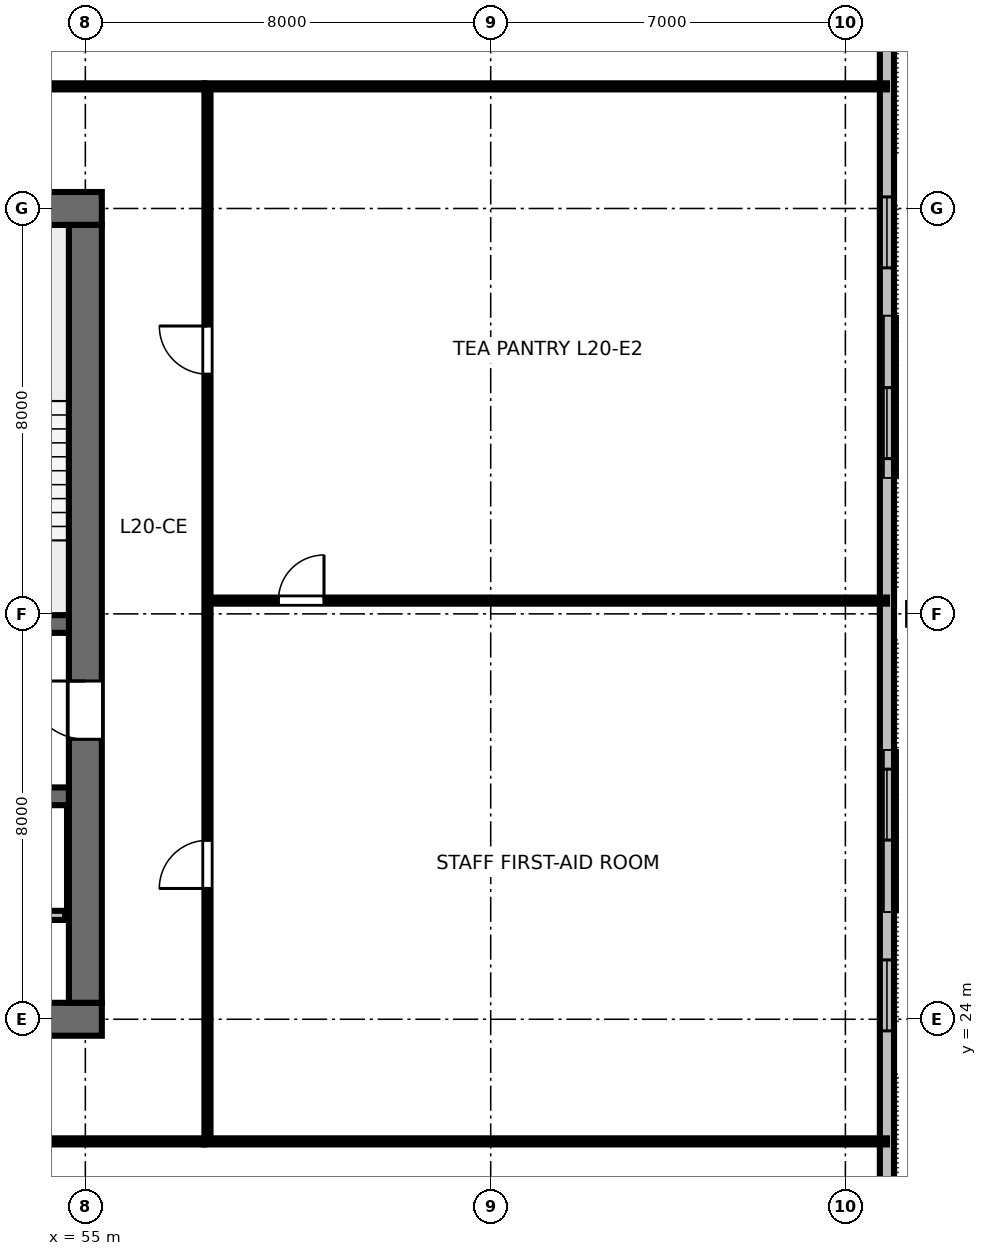
"""IFC4 building model, lengths in metres.
Left out: names, types, materials, properties, quantities, classifications, styles, units other than length and angle.
Written with IfcOpenShell. Run it as: python <this file> out.ifc"""

import sys

from ifc_helpers import new_model, si_unit, direction, frame, frame_2d, origin, origin_2d, place, context, subcontext, project, spatial, rectangle, i_section, extrude, element, fill, save


model = new_model("IFC4")
c1 = context("Model", 3, precision=1e-05, world=origin(), true_north=direction((0.0, 1.0)))
c2 = subcontext(c1, "Body", "Model", "MODEL_VIEW")
j1 = project(units=[si_unit("LENGTHUNIT", "METRE"), si_unit("PLANEANGLEUNIT", "RADIAN")], contexts=[c1])
p1 = place(None, origin())
s1 = spatial("IfcSite", under=j1, at=p1, CompositionType="ELEMENT")
p2 = place(p1, origin())
s2 = spatial("IfcBuilding", under=s1, at=p2, CompositionType="ELEMENT")
p3 = place(p2, frame((0.0, 0.0, 78.4)))
s3 = spatial("IfcBuildingStorey", under=s2, at=p3, CompositionType="ELEMENT", Elevation=78.4)
p4 = place(p3, frame((36.675, 24.0, 0.0), z_axis=(0.0, 0.0, 1.0), x_axis=(1.0, 0.0, 0.0)))
e1 = element("IfcWall", 1, at=p4, inside=s3, PredefinedType="SHEAR", context=c2, shape_type="SweptSolid", body=[
    extrude(rectangle(XDim=18.65, YDim=0.65, at=frame_2d((9.325, 0.0))), origin(), (0.0, 0.0, 1.0), 3.36),
])
p5 = place(p4, frame((5.725, 0.0, 0.0)))
e2 = element("IfcOpeningElement", 2, at=p5, cuts=e1, PredefinedType="OPENING", context=c2, shape_type="SweptSolid", body=[
    extrude(rectangle(XDim=1.6, YDim=2.15, at=frame_2d((0.8, 1.075))), frame((0.0, 0.335, 0.0), z_axis=(0.0, -1.0, 0.0), x_axis=(1.0, 0.0, 0.0)), (0.0, 0.0, 1.0), 0.67),
])
p6 = place(p4, frame((12.125, 0.0, 0.0)))
e3 = element("IfcOpeningElement", 3, at=p6, cuts=e1, PredefinedType="OPENING", context=c2, shape_type="SweptSolid", body=[
    extrude(rectangle(XDim=1.6, YDim=2.15, at=frame_2d((0.8, 1.075))), frame((0.0, 0.335, 0.0), z_axis=(0.0, -1.0, 0.0), x_axis=(1.0, 0.0, 0.0)), (0.0, 0.0, 1.0), 0.67),
])
p7 = place(p3, frame((36.675, 40.0, 0.0), z_axis=(0.0, 0.0, 1.0), x_axis=(1.0, 0.0, 0.0)))
e4 = element("IfcWall", 4, at=p7, inside=s3, PredefinedType="SHEAR", context=c2, shape_type="SweptSolid", body=[
    extrude(rectangle(XDim=18.65, YDim=0.65, at=frame_2d((9.325, 0.0))), origin(), (0.0, 0.0, 1.0), 3.36),
])
p8 = place(p7, frame((8.825, 0.0, 0.0)))
e5 = element("IfcOpeningElement", 5, at=p8, cuts=e4, PredefinedType="OPENING", context=c2, shape_type="SweptSolid", body=[
    extrude(rectangle(XDim=1.0, YDim=2.15, at=frame_2d((0.5, 1.075))), frame((0.0, 0.335, 0.0), z_axis=(0.0, -1.0, 0.0), x_axis=(1.0, 0.0, 0.0)), (0.0, 0.0, 1.0), 0.67),
])
p9 = place(p3, frame((55.0, 24.325, 0.0), z_axis=(0.0, 0.0, 1.0), x_axis=(0.0, 1.0, 0.0)))
e6 = element("IfcWall", 6, at=p9, inside=s3, PredefinedType="SHEAR", context=c2, shape_type="SweptSolid", body=[
    extrude(rectangle(XDim=15.35, YDim=0.65, at=frame_2d((7.675, 0.0))), origin(), (0.0, 0.0, 1.0), 3.36),
])
p10 = place(p9, frame((5.2, 0.0, 0.0)))
e7 = element("IfcOpeningElement", 7, at=p10, cuts=e6, PredefinedType="OPENING", context=c2, shape_type="SweptSolid", body=[
    extrude(rectangle(XDim=1.15, YDim=2.15, at=frame_2d((0.575, 1.075))), frame((0.0, 0.335, 0.0), z_axis=(0.0, -1.0, 0.0), x_axis=(1.0, 0.0, 0.0)), (0.0, 0.0, 1.0), 0.67),
])
p11 = place(p3, frame((37.325, 31.8, 0.0), z_axis=(0.0, 0.0, 1.0), x_axis=(1.0, 0.0, 0.0)))
e8 = element("IfcWall", 8, at=p11, inside=s3, PredefinedType="SHEAR", context=c2, shape_type="SweptSolid", body=[
    extrude(rectangle(XDim=17.35, YDim=0.35, at=frame_2d((8.675, 0.0))), origin(), (0.0, 0.0, 1.0), 3.36),
])
p12 = place(p11, frame((0.725, 0.0, 0.0)))
e9 = element("IfcOpeningElement", 9, at=p12, cuts=e8, PredefinedType="OPENING", context=c2, shape_type="SweptSolid", body=[
    extrude(rectangle(XDim=1.1, YDim=2.15, at=frame_2d((0.55, 1.075))), frame((0.0, 0.185, 0.0), z_axis=(0.0, -1.0, 0.0), x_axis=(1.0, 0.0, 0.0)), (0.0, 0.0, 1.0), 0.37),
])
p13 = place(p11, frame((14.625, 0.0, 0.0)))
e10 = element("IfcOpeningElement", 10, at=p13, cuts=e8, PredefinedType="OPENING", context=c2, shape_type="SweptSolid", body=[
    extrude(rectangle(XDim=1.1, YDim=2.15, at=frame_2d((0.55, 1.075))), frame((0.0, 0.185, 0.0), z_axis=(0.0, -1.0, 0.0), x_axis=(1.0, 0.0, 0.0)), (0.0, 0.0, 1.0), 0.37),
])
p14 = place(p3, frame((37.325, 28.4, 0.0), z_axis=(0.0, 0.0, 1.0), x_axis=(1.0, 0.0, 0.0)))
e11 = element("IfcWall", 11, at=p14, inside=s3, PredefinedType="SHEAR", context=c2, shape_type="SweptSolid", body=[
    extrude(rectangle(XDim=17.35, YDim=0.35, at=frame_2d((8.675, 0.0))), origin(), (0.0, 0.0, 1.0), 3.36),
])
p15 = place(p3, frame((71.48, 32.0, 0.0), z_axis=(-0.190004151907, 0.0, 0.981783286809), x_axis=(0.981783286809, 0.0, 0.190004151907)))
e12 = element("IfcColumn", 12, at=p15, inside=s3, PredefinedType="COLUMN", context=c2, shape_type="SweptSolid", body=[
    extrude(i_section(OverallWidth=0.428, OverallDepth=0.483, WebThickness=0.051, FlangeThickness=0.082, FilletRadius=0.025, at=origin_2d()), origin(), (0.0, 0.0, 1.0), 3.42),
])
p16 = place(p3, frame((70.82, 13.96, 0.0), z_axis=(0.0, 0.0, 1.0), x_axis=(0.0, 1.0, 0.0)))
e13 = element("IfcWall", 13, at=p16, inside=s3, PredefinedType="STANDARD", context=c2, shape_type="SweptSolid", body=[
    extrude(rectangle(XDim=36.08, YDim=0.28, at=frame_2d((18.04, 0.0))), origin(), (0.0, 0.0, 1.0), 2.662),
])
p17 = place(p16, frame((9.811, 0.0, 0.85)))
e14 = element("IfcOpeningElement", 14, at=p17, cuts=e13, PredefinedType="OPENING", context=c2, shape_type="SweptSolid", body=[
    extrude(rectangle(XDim=1.4, YDim=1.2, at=frame_2d((0.7, 0.6))), frame((0.0, 0.15, 0.0), z_axis=(0.0, -1.0, 0.0), x_axis=(1.0, 0.0, 0.0)), (0.0, 0.0, 1.0), 0.3),
])
p18 = place(p16, frame((13.576, 0.0, 0.85)))
e15 = element("IfcOpeningElement", 15, at=p18, cuts=e13, PredefinedType="OPENING", context=c2, shape_type="SweptSolid", body=[
    extrude(rectangle(XDim=1.4, YDim=1.2, at=frame_2d((0.7, 0.6))), frame((0.0, 0.15, 0.0), z_axis=(0.0, -1.0, 0.0), x_axis=(1.0, 0.0, 0.0)), (0.0, 0.0, 1.0), 0.3),
])
p19 = place(p16, frame((21.104, 0.0, 0.85)))
e16 = element("IfcOpeningElement", 16, at=p19, cuts=e13, PredefinedType="OPENING", context=c2, shape_type="SweptSolid", body=[
    extrude(rectangle(XDim=1.4, YDim=1.2, at=frame_2d((0.7, 0.6))), frame((0.0, 0.15, 0.0), z_axis=(0.0, -1.0, 0.0), x_axis=(1.0, 0.0, 0.0)), (0.0, 0.0, 1.0), 0.3),
])
p20 = place(p16, frame((24.869, 0.0, 0.85)))
e17 = element("IfcOpeningElement", 17, at=p20, cuts=e13, PredefinedType="OPENING", context=c2, shape_type="SweptSolid", body=[
    extrude(rectangle(XDim=1.4, YDim=1.2, at=frame_2d((0.7, 0.6))), frame((0.0, 0.15, 0.0), z_axis=(0.0, -1.0, 0.0), x_axis=(1.0, 0.0, 0.0)), (0.0, 0.0, 1.0), 0.3),
])
p21 = place(p3, frame((37.4, 26.05, 0.0), z_axis=(0.0, 0.0, 1.0), x_axis=(1.0, 0.0, 0.0)))
e18 = element("IfcWall", 18, at=p21, inside=s3, PredefinedType="PARTITIONING", context=c2, shape_type="SweptSolid", body=[
    extrude(rectangle(XDim=17.2, YDim=0.18, at=frame_2d((8.6, 0.0))), origin(), (0.0, 0.0, 1.0), 3.36),
])
p22 = place(p21, frame((1.1, 0.0, 0.0)))
e19 = element("IfcOpeningElement", 19, at=p22, cuts=e18, PredefinedType="OPENING", context=c2, shape_type="SweptSolid", body=[
    extrude(rectangle(XDim=1.05, YDim=2.15, at=frame_2d((0.525, 1.075))), frame((0.0, 0.1, 0.0), z_axis=(0.0, -1.0, 0.0), x_axis=(1.0, 0.0, 0.0)), (0.0, 0.0, 1.0), 0.2),
])
p23 = place(p21, frame((3.0, 0.0, 0.0)))
e20 = element("IfcOpeningElement", 20, at=p23, cuts=e18, PredefinedType="OPENING", context=c2, shape_type="SweptSolid", body=[
    extrude(rectangle(XDim=1.05, YDim=2.15, at=frame_2d((0.525, 1.075))), frame((0.0, 0.1, 0.0), z_axis=(0.0, -1.0, 0.0), x_axis=(1.0, 0.0, 0.0)), (0.0, 0.0, 1.0), 0.2),
])
p24 = place(p3, frame((34.65, 21.59, 0.0), z_axis=(0.0, 0.0, 1.0), x_axis=(1.0, 0.0, 0.0)))
e21 = element("IfcWall", 21, at=p24, inside=s3, PredefinedType="PARTITIONING", context=c2, shape_type="SweptSolid", body=[
    extrude(rectangle(XDim=22.7, YDim=0.12, at=frame_2d((11.35, 0.0))), origin(), (0.0, 0.0, 1.0), 2.64),
])
p25 = place(p24, frame((3.463, 0.0, 0.0)))
e22 = element("IfcOpeningElement", 22, at=p25, cuts=e21, PredefinedType="OPENING", context=c2, shape_type="SweptSolid", body=[
    extrude(rectangle(XDim=0.95, YDim=2.15, at=frame_2d((0.475, 1.075))), frame((0.0, 0.07, 0.0), z_axis=(0.0, -1.0, 0.0), x_axis=(1.0, 0.0, 0.0)), (0.0, 0.0, 1.0), 0.14),
])
p26 = place(p24, frame((14.673, 0.0, 0.0)))
e23 = element("IfcOpeningElement", 23, at=p26, cuts=e21, PredefinedType="OPENING", context=c2, shape_type="SweptSolid", body=[
    extrude(rectangle(XDim=0.95, YDim=2.15, at=frame_2d((0.475, 1.075))), frame((0.0, 0.07, 0.0), z_axis=(0.0, -1.0, 0.0), x_axis=(1.0, 0.0, 0.0)), (0.0, 0.0, 1.0), 0.14),
])
p27 = place(p3, frame((34.65, 42.41, 0.0), z_axis=(0.0, 0.0, 1.0), x_axis=(1.0, 0.0, 0.0)))
e24 = element("IfcWall", 24, at=p27, inside=s3, PredefinedType="PARTITIONING", context=c2, shape_type="SweptSolid", body=[
    extrude(rectangle(XDim=22.7, YDim=0.12, at=frame_2d((11.35, 0.0))), origin(), (0.0, 0.0, 1.0), 2.64),
])
p28 = place(p27, frame((4.272, 0.0, 0.0)))
e25 = element("IfcOpeningElement", 25, at=p28, cuts=e24, PredefinedType="OPENING", context=c2, shape_type="SweptSolid", body=[
    extrude(rectangle(XDim=0.95, YDim=2.15, at=frame_2d((0.475, 1.075))), frame((0.0, 0.07, 0.0), z_axis=(0.0, -1.0, 0.0), x_axis=(1.0, 0.0, 0.0)), (0.0, 0.0, 1.0), 0.14),
])
p29 = place(p27, frame((11.432, 0.0, 0.0)))
e26 = element("IfcOpeningElement", 26, at=p29, cuts=e24, PredefinedType="OPENING", context=c2, shape_type="SweptSolid", body=[
    extrude(rectangle(XDim=0.95, YDim=2.15, at=frame_2d((0.475, 1.075))), frame((0.0, 0.07, 0.0), z_axis=(0.0, -1.0, 0.0), x_axis=(1.0, 0.0, 0.0)), (0.0, 0.0, 1.0), 0.14),
])
p30 = place(p27, frame((18.035, 0.0, 0.0)))
e27 = element("IfcOpeningElement", 27, at=p30, cuts=e24, PredefinedType="OPENING", context=c2, shape_type="SweptSolid", body=[
    extrude(rectangle(XDim=0.95, YDim=2.15, at=frame_2d((0.475, 1.075))), frame((0.0, 0.07, 0.0), z_axis=(0.0, -1.0, 0.0), x_axis=(1.0, 0.0, 0.0)), (0.0, 0.0, 1.0), 0.14),
])
p31 = place(p3, frame((57.41, 32.262, 0.0), z_axis=(0.0, 0.0, 1.0), x_axis=(1.0, 0.0, 0.0)))
e28 = element("IfcWall", 28, at=p31, inside=s3, PredefinedType="PARTITIONING", context=c2, shape_type="SweptSolid", body=[
    extrude(rectangle(XDim=13.41, YDim=0.12, at=frame_2d((6.705, 0.0))), origin(), (0.0, 0.0, 1.0), 2.64),
])
p32 = place(p31, frame((1.4, 0.0, 0.0)))
e29 = element("IfcOpeningElement", 29, at=p32, cuts=e28, PredefinedType="OPENING", context=c2, shape_type="SweptSolid", body=[
    extrude(rectangle(XDim=0.9, YDim=2.15, at=frame_2d((0.45, 1.075))), frame((0.0, 0.07, 0.0), z_axis=(0.0, -1.0, 0.0), x_axis=(1.0, 0.0, 0.0)), (0.0, 0.0, 1.0), 0.14),
])
p33 = place(p3, frame((57.41, 21.65, 0.0), z_axis=(0.0, 0.0, 1.0), x_axis=(0.0, 1.0, 0.0)))
e30 = element("IfcWall", 30, at=p33, inside=s3, PredefinedType="PARTITIONING", context=c2, shape_type="SweptSolid", body=[
    extrude(rectangle(XDim=20.7, YDim=0.12, at=frame_2d((10.35, 0.0))), origin(), (0.0, 0.0, 1.0), 2.64),
])
p34 = place(p33, frame((4.931, 0.0, 0.0)))
e31 = element("IfcOpeningElement", 31, at=p34, cuts=e30, PredefinedType="OPENING", context=c2, shape_type="SweptSolid", body=[
    extrude(rectangle(XDim=0.95, YDim=2.15, at=frame_2d((0.475, 1.075))), frame((0.0, 0.07, 0.0), z_axis=(0.0, -1.0, 0.0), x_axis=(1.0, 0.0, 0.0)), (0.0, 0.0, 1.0), 0.14),
])
p35 = place(p33, frame((15.081, 0.0, 0.0)))
e32 = element("IfcOpeningElement", 32, at=p35, cuts=e30, PredefinedType="OPENING", context=c2, shape_type="SweptSolid", body=[
    extrude(rectangle(XDim=0.95, YDim=2.15, at=frame_2d((0.475, 1.075))), frame((0.0, 0.07, 0.0), z_axis=(0.0, -1.0, 0.0), x_axis=(1.0, 0.0, 0.0)), (0.0, 0.0, 1.0), 0.14),
])
for number, where, z_axis, x_axis in (
    (33, (57.35, 21.59, 0.0), (0.0, 0.0, 1.0), (1.0, 0.0, 0.0)),
    (34, (57.35, 42.41, 0.0), (0.0, 0.0, 1.0), (1.0, 0.0, 0.0)),
):
    element("IfcWall", number, at=place(p3, frame(where, z_axis=z_axis, x_axis=x_axis)), inside=s3, PredefinedType="PARTITIONING", context=c2, shape_type="SweptSolid", body=[
        extrude(rectangle(XDim=13.47, YDim=0.12, at=frame_2d((6.735, 0.0))), origin(), (0.0, 0.0, 1.0), 2.64),
    ])
p36 = place(p17, origin())
e35 = element("IfcWindow", 35, at=p36, inside=s3, PartitioningType="SINGLE_PANEL", PredefinedType="WINDOW", context=c2, shape_type="SweptSolid", body=[
    extrude(rectangle(XDim=1.4, YDim=1.2, at=frame_2d((0.7, 0.6))), frame((0.0, 0.03, 0.0), z_axis=(0.0, -1.0, 0.0), x_axis=(1.0, 0.0, 0.0)), (0.0, 0.0, 1.0), 0.06),
])
fill(e14, e35)
p37 = place(p18, origin())
e36 = element("IfcWindow", 36, at=p37, inside=s3, PartitioningType="SINGLE_PANEL", PredefinedType="WINDOW", context=c2, shape_type="SweptSolid", body=[
    extrude(rectangle(XDim=1.4, YDim=1.2, at=frame_2d((0.7, 0.6))), frame((0.0, 0.03, 0.0), z_axis=(0.0, -1.0, 0.0), x_axis=(1.0, 0.0, 0.0)), (0.0, 0.0, 1.0), 0.06),
])
fill(e15, e36)
p38 = place(p19, origin())
e37 = element("IfcWindow", 37, at=p38, inside=s3, PartitioningType="SINGLE_PANEL", PredefinedType="WINDOW", context=c2, shape_type="SweptSolid", body=[
    extrude(rectangle(XDim=1.4, YDim=1.2, at=frame_2d((0.7, 0.6))), frame((0.0, 0.03, 0.0), z_axis=(0.0, -1.0, 0.0), x_axis=(1.0, 0.0, 0.0)), (0.0, 0.0, 1.0), 0.06),
])
fill(e16, e37)
p39 = place(p20, origin())
e38 = element("IfcWindow", 38, at=p39, inside=s3, PartitioningType="SINGLE_PANEL", PredefinedType="WINDOW", context=c2, shape_type="SweptSolid", body=[
    extrude(rectangle(XDim=1.4, YDim=1.2, at=frame_2d((0.7, 0.6))), frame((0.0, 0.03, 0.0), z_axis=(0.0, -1.0, 0.0), x_axis=(1.0, 0.0, 0.0)), (0.0, 0.0, 1.0), 0.06),
])
fill(e17, e38)
p40 = place(p10, origin())
e39 = element("IfcDoor", 39, at=p40, inside=s3, OperationType="SINGLE_SWING_RIGHT", PredefinedType="DOOR", context=c2, shape_type="SweptSolid", body=[
    extrude(rectangle(XDim=1.15, YDim=2.15, at=frame_2d((0.575, 1.075))), frame((0.0, 0.025, 0.0), z_axis=(0.0, -1.0, 0.0), x_axis=(1.0, 0.0, 0.0)), (0.0, 0.0, 1.0), 0.05),
])
fill(e7, e39)
p41 = place(p32, origin())
e40 = element("IfcDoor", 40, at=p41, inside=s3, OperationType="SINGLE_SWING_RIGHT", PredefinedType="DOOR", context=c2, shape_type="SweptSolid", body=[
    extrude(rectangle(XDim=0.9, YDim=2.15, at=frame_2d((0.45, 1.075))), frame((0.0, 0.025, 0.0), z_axis=(0.0, -1.0, 0.0), x_axis=(1.0, 0.0, 0.0)), (0.0, 0.0, 1.0), 0.05),
])
fill(e29, e40)
p42 = place(p34, origin())
e41 = element("IfcDoor", 41, at=p42, inside=s3, OperationType="SINGLE_SWING_LEFT", PredefinedType="DOOR", context=c2, shape_type="SweptSolid", body=[
    extrude(rectangle(XDim=0.95, YDim=2.15, at=frame_2d((0.475, 1.075))), frame((0.0, 0.025, 0.0), z_axis=(0.0, -1.0, 0.0), x_axis=(1.0, 0.0, 0.0)), (0.0, 0.0, 1.0), 0.05),
])
fill(e31, e41)
p43 = place(p35, origin())
e42 = element("IfcDoor", 42, at=p43, inside=s3, OperationType="SINGLE_SWING_RIGHT", PredefinedType="DOOR", context=c2, shape_type="SweptSolid", body=[
    extrude(rectangle(XDim=0.95, YDim=2.15, at=frame_2d((0.475, 1.075))), frame((0.0, 0.025, 0.0), z_axis=(0.0, -1.0, 0.0), x_axis=(1.0, 0.0, 0.0)), (0.0, 0.0, 1.0), 0.05),
])
fill(e32, e42)
save(model, sys.argv[1])
